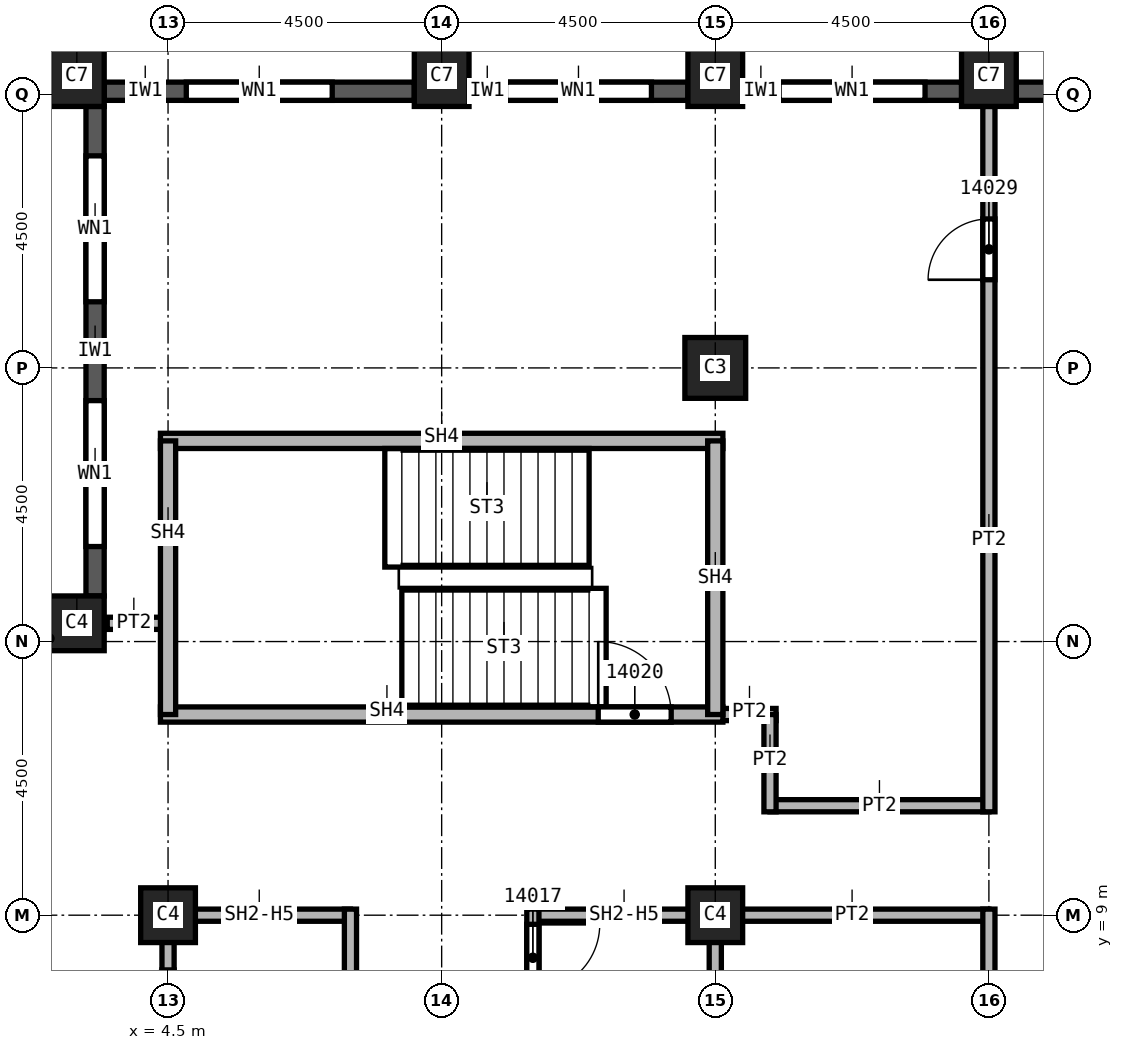
"""IFC4 building model, lengths in metres.
Left out: names, types, materials, properties, quantities, classifications, styles, units other than length and angle.
Written with IfcOpenShell. Run it as: python <this file> out.ifc"""

import sys

from ifc_helpers import new_model, si_unit, direction, frame, frame_2d, origin, origin_2d, place, context, subcontext, project, spatial, rectangle, extrude, element, fill, save


model = new_model("IFC4")
c1 = context("Model", 3, precision=1e-05, world=origin(), true_north=direction((0.0, 1.0)))
c2 = subcontext(c1, "Body", "Model", "MODEL_VIEW")
j1 = project(units=[si_unit("LENGTHUNIT", "METRE"), si_unit("PLANEANGLEUNIT", "RADIAN")], contexts=[c1])
p1 = place(None, origin())
s1 = spatial("IfcSite", under=j1, at=p1, CompositionType="ELEMENT")
p2 = place(p1, origin())
s2 = spatial("IfcBuilding", under=s1, at=p2, CompositionType="ELEMENT")
p3 = place(p2, frame((0.0, 0.0, 220.0)))
s3 = spatial("IfcBuildingStorey", under=s2, at=p3, CompositionType="ELEMENT", Elevation=220.0)
p4 = place(p3, frame((13.5, 18.0, 0.0), z_axis=(0.0, 0.0, 1.0), x_axis=(1.0, 0.0, 0.0)))
e1 = element("IfcColumn", 1, at=p4, inside=s3, PredefinedType="COLUMN", context=c2, shape_type="SweptSolid", body=[
    extrude(rectangle(XDim=1.0, YDim=1.0, at=origin_2d()), origin(), (0.0, 0.0, 1.0), 3.72),
])
for number, where, z_axis, x_axis in (
    (2, (4.5, 9.0, 0.0), (0.0, 0.0, 1.0), (1.0, 0.0, 0.0)),
    (3, (13.5, 9.0, 0.0), (0.0, 0.0, 1.0), (1.0, 0.0, 0.0)),
):
    element("IfcColumn", number, at=place(p3, frame(where, z_axis=z_axis, x_axis=x_axis)), inside=s3, PredefinedType="COLUMN", context=c2, shape_type="SweptSolid", body=[
        extrude(rectangle(XDim=0.9, YDim=0.9, at=origin_2d()), origin(), (0.0, 0.0, 1.0), 3.72),
    ])
for number, where, z_axis, x_axis in (
    (4, (3.0, 22.8, 0.0), (0.0, 0.0, 1.0), (1.0, 0.0, 0.0)),
    (5, (9.0, 22.8, 0.0), (0.0, 0.0, 1.0), (1.0, 0.0, 0.0)),
    (6, (13.5, 22.8, 0.0), (0.0, 0.0, 1.0), (1.0, 0.0, 0.0)),
    (7, (18.0, 22.8, 0.0), (0.0, 0.0, 1.0), (1.0, 0.0, 0.0)),
):
    element("IfcColumn", number, at=place(p3, frame(where, z_axis=z_axis, x_axis=x_axis)), inside=s3, PredefinedType="COLUMN", context=c2, shape_type="SweptSolid", body=[
        extrude(rectangle(XDim=0.9, YDim=1.0, at=origin_2d()), origin(), (0.0, 0.0, 1.0), 3.72),
    ])
p5 = place(p3, frame((3.0, 13.8, 0.0), z_axis=(0.0, 0.0, 1.0), x_axis=(1.0, 0.0, 0.0)))
e8 = element("IfcColumn", 8, at=p5, inside=s3, PredefinedType="COLUMN", context=c2, shape_type="SweptSolid", body=[
    extrude(rectangle(XDim=0.9, YDim=0.9, at=origin_2d()), origin(), (0.0, 0.0, 1.0), 3.72),
])
p6 = place(p3, frame((22.05, 22.55, 0.0), z_axis=(0.0, 0.0, 1.0), x_axis=(-1.0, 0.0, 0.0)))
e9 = element("IfcWall", 9, at=p6, inside=s3, PredefinedType="SOLIDWALL", context=c2, shape_type="SweptSolid", body=[
    extrude(rectangle(XDim=3.6, YDim=0.3, at=frame_2d((1.8, 0.0))), origin(), (0.0, 0.0, 1.0), 3.12),
])
p7 = place(p6, frame((0.775, 0.0, 0.8)))
e10 = element("IfcOpeningElement", 10, at=p7, cuts=e9, PredefinedType="OPENING", context=c2, shape_type="SweptSolid", body=[
    extrude(rectangle(XDim=1.0, YDim=1.95, at=frame_2d((0.5, 0.975))), frame((0.0, 0.15, 0.0), z_axis=(0.0, -1.0, 0.0), x_axis=(1.0, 0.0, 0.0)), (0.0, 0.0, 1.0), 0.3),
])
p8 = place(p6, frame((2.375, 0.0, 0.8)))
e11 = element("IfcOpeningElement", 11, at=p8, cuts=e9, PredefinedType="OPENING", context=c2, shape_type="SweptSolid", body=[
    extrude(rectangle(XDim=0.6, YDim=1.95, at=frame_2d((0.3, 0.975))), frame((0.0, 0.15, 0.0), z_axis=(0.0, -1.0, 0.0), x_axis=(1.0, 0.0, 0.0)), (0.0, 0.0, 1.0), 0.3),
])
p9 = place(p3, frame((17.55, 22.55, 0.0), z_axis=(0.0, 0.0, 1.0), x_axis=(-1.0, 0.0, 0.0)))
e12 = element("IfcWall", 12, at=p9, inside=s3, PredefinedType="SOLIDWALL", context=c2, shape_type="SweptSolid", body=[
    extrude(rectangle(XDim=3.6, YDim=0.3, at=frame_2d((1.8, 0.0))), origin(), (0.0, 0.0, 1.0), 3.12),
])
p10 = place(p9, frame((0.6, 0.0, 0.8)))
e13 = element("IfcOpeningElement", 13, at=p10, cuts=e12, PredefinedType="OPENING", context=c2, shape_type="SweptSolid", body=[
    extrude(rectangle(XDim=2.4, YDim=1.95, at=frame_2d((1.2, 0.975))), frame((0.0, 0.15, 0.0), z_axis=(0.0, -1.0, 0.0), x_axis=(1.0, 0.0, 0.0)), (0.0, 0.0, 1.0), 0.3),
])
p11 = place(p3, frame((13.05, 22.55, 0.0), z_axis=(0.0, 0.0, 1.0), x_axis=(-1.0, 0.0, 0.0)))
e14 = element("IfcWall", 14, at=p11, inside=s3, PredefinedType="SOLIDWALL", context=c2, shape_type="SweptSolid", body=[
    extrude(rectangle(XDim=3.6, YDim=0.3, at=frame_2d((1.8, 0.0))), origin(), (0.0, 0.0, 1.0), 3.12),
])
p12 = place(p11, frame((0.6, 0.0, 0.8)))
e15 = element("IfcOpeningElement", 15, at=p12, cuts=e14, PredefinedType="OPENING", context=c2, shape_type="SweptSolid", body=[
    extrude(rectangle(XDim=2.4, YDim=1.95, at=frame_2d((1.2, 0.975))), frame((0.0, 0.15, 0.0), z_axis=(0.0, -1.0, 0.0), x_axis=(1.0, 0.0, 0.0)), (0.0, 0.0, 1.0), 0.3),
])
p13 = place(p3, frame((8.55, 22.55, 0.0), z_axis=(0.0, 0.0, 1.0), x_axis=(-1.0, 0.0, 0.0)))
e16 = element("IfcWall", 16, at=p13, inside=s3, PredefinedType="SOLIDWALL", context=c2, shape_type="SweptSolid", body=[
    extrude(rectangle(XDim=5.1, YDim=0.3, at=frame_2d((2.55, 0.0))), origin(), (0.0, 0.0, 1.0), 3.12),
])
p14 = place(p13, frame((1.35, 0.0, 0.8)))
e17 = element("IfcOpeningElement", 17, at=p14, cuts=e16, PredefinedType="OPENING", context=c2, shape_type="SweptSolid", body=[
    extrude(rectangle(XDim=2.4, YDim=1.95, at=frame_2d((1.2, 0.975))), frame((0.0, 0.15, 0.0), z_axis=(0.0, -1.0, 0.0), x_axis=(1.0, 0.0, 0.0)), (0.0, 0.0, 1.0), 0.3),
])
p15 = place(p3, frame((3.3, 22.3, 0.0), z_axis=(0.0, 0.0, 1.0), x_axis=(0.0, -1.0, 0.0)))
e18 = element("IfcWall", 18, at=p15, inside=s3, PredefinedType="SOLIDWALL", context=c2, shape_type="SweptSolid", body=[
    extrude(rectangle(XDim=8.05, YDim=0.3, at=frame_2d((4.025, 0.0))), origin(), (0.0, 0.0, 1.0), 3.12),
])
p16 = place(p15, frame((0.812, 0.0, 0.8)))
e19 = element("IfcOpeningElement", 19, at=p16, cuts=e18, PredefinedType="OPENING", context=c2, shape_type="SweptSolid", body=[
    extrude(rectangle(XDim=2.4, YDim=1.95, at=frame_2d((1.2, 0.975))), frame((0.0, 0.15, 0.0), z_axis=(0.0, -1.0, 0.0), x_axis=(1.0, 0.0, 0.0)), (0.0, 0.0, 1.0), 0.3),
])
p17 = place(p15, frame((4.837, 0.0, 0.8)))
e20 = element("IfcOpeningElement", 20, at=p17, cuts=e18, PredefinedType="OPENING", context=c2, shape_type="SweptSolid", body=[
    extrude(rectangle(XDim=2.4, YDim=1.95, at=frame_2d((1.2, 0.975))), frame((0.0, 0.15, 0.0), z_axis=(0.0, -1.0, 0.0), x_axis=(1.0, 0.0, 0.0)), (0.0, 0.0, 1.0), 0.3),
])
p18 = place(p3, frame((3.5, 13.8, 0.0), z_axis=(0.0, 0.0, 1.0), x_axis=(1.0, 0.0, 0.0)))
e21 = element("IfcWall", 21, at=p18, inside=s3, PredefinedType="PARTITIONING", context=c2, shape_type="SweptSolid", body=[
    extrude(rectangle(XDim=1.0, YDim=0.2, at=frame_2d((0.5, 0.0))), origin(), (0.0, 0.0, 1.0), 3.72),
])
p19 = place(p3, frame((13.375, 12.3, 0.0), z_axis=(0.0, 0.0, 1.0), x_axis=(1.0, 0.0, 0.0)))
e22 = element("IfcWall", 22, at=p19, inside=s3, PredefinedType="PARTITIONING", context=c2, shape_type="SweptSolid", body=[
    extrude(rectangle(XDim=1.125, YDim=0.2, at=frame_2d((0.562, 0.0))), origin(), (0.0, 0.0, 1.0), 3.72),
])
p20 = place(p3, frame((18.0, 9.0, 0.0), z_axis=(0.0, 0.0, 1.0), x_axis=(-1.0, 0.0, 0.0)))
e23 = element("IfcWall", 23, at=p20, inside=s3, PredefinedType="PARTITIONING", context=c2, shape_type="SweptSolid", body=[
    extrude(rectangle(XDim=4.5, YDim=0.2, at=frame_2d((2.25, 0.0))), origin(), (0.0, 0.0, 1.0), 3.72),
])
p21 = place(p3, frame((14.4, 10.8, 0.0), z_axis=(0.0, 0.0, 1.0), x_axis=(1.0, 0.0, 0.0)))
e24 = element("IfcWall", 24, at=p21, inside=s3, PredefinedType="PARTITIONING", context=c2, shape_type="SweptSolid", body=[
    extrude(rectangle(XDim=3.6, YDim=0.2, at=frame_2d((1.8, 0.0))), origin(), (0.0, 0.0, 1.0), 3.72),
])
p22 = place(p3, frame((14.4, 12.3, 0.0), z_axis=(0.0, 0.0, 1.0), x_axis=(0.0, -1.0, 0.0)))
e25 = element("IfcWall", 25, at=p22, inside=s3, PredefinedType="PARTITIONING", context=c2, shape_type="SweptSolid", body=[
    extrude(rectangle(XDim=1.6, YDim=0.2, at=frame_2d((0.8, 0.0))), origin(), (0.0, 0.0, 1.0), 3.72),
])
p23 = place(p3, frame((18.0, -9.1, 0.0), z_axis=(0.0, 0.0, 1.0), x_axis=(0.0, 1.0, 0.0)))
e26 = element("IfcWall", 26, at=p23, inside=s3, PredefinedType="PARTITIONING", context=c2, shape_type="SweptSolid", body=[
    extrude(rectangle(XDim=18.2, YDim=0.2, at=frame_2d((9.1, 0.0))), origin(), (0.0, 0.0, 1.0), 3.72),
])
p24 = place(p23, frame((4.3, 0.0, 0.0)))
e27 = element("IfcOpeningElement", 27, at=p24, cuts=e26, PredefinedType="OPENING", context=c2, shape_type="SweptSolid", body=[
    extrude(rectangle(XDim=1.0, YDim=2.1, at=frame_2d((0.5, 1.05))), frame((0.0, 0.1, 0.0), z_axis=(0.0, -1.0, 0.0), x_axis=(1.0, 0.0, 0.0)), (0.0, 0.0, 1.0), 0.2),
])
p25 = place(p23, frame((12.4, 0.0, 0.0)))
e28 = element("IfcOpeningElement", 28, at=p25, cuts=e26, PredefinedType="OPENING", context=c2, shape_type="SweptSolid", body=[
    extrude(rectangle(XDim=1.0, YDim=2.1, at=frame_2d((0.5, 1.05))), frame((0.0, 0.1, 0.0), z_axis=(0.0, -1.0, 0.0), x_axis=(1.0, 0.0, 0.0)), (0.0, 0.0, 1.0), 0.2),
])
p26 = place(p3, frame((18.0, 10.7, 0.0), z_axis=(0.0, 0.0, 1.0), x_axis=(0.0, 1.0, 0.0)))
e29 = element("IfcWall", 29, at=p26, inside=s3, PredefinedType="PARTITIONING", context=c2, shape_type="SweptSolid", body=[
    extrude(rectangle(XDim=11.6, YDim=0.2, at=frame_2d((5.8, 0.0))), origin(), (0.0, 0.0, 1.0), 3.72),
])
p27 = place(p26, frame((8.75, 0.0, 0.0)))
e30 = element("IfcOpeningElement", 30, at=p27, cuts=e29, PredefinedType="OPENING", context=c2, shape_type="SweptSolid", body=[
    extrude(rectangle(XDim=1.0, YDim=2.1, at=frame_2d((0.5, 1.05))), frame((0.0, 0.1, 0.0), z_axis=(0.0, -1.0, 0.0), x_axis=(1.0, 0.0, 0.0)), (0.0, 0.0, 1.0), 0.2),
])
p28 = place(p3, frame((4.5, 0.0, 0.0), z_axis=(0.0, 0.0, 1.0), x_axis=(0.0, 1.0, 0.0)))
e31 = element("IfcWall", 31, at=p28, inside=s3, PredefinedType="SOLIDWALL", context=c2, shape_type="SweptSolid", body=[
    extrude(rectangle(XDim=9.1, YDim=0.2, at=frame_2d((4.55, 0.0))), origin(), (0.0, 0.0, 1.0), 2.958),
])
p29 = place(p28, frame((3.4, 0.0, 0.0)))
e32 = element("IfcOpeningElement", 32, at=p29, cuts=e31, PredefinedType="OPENING", context=c2, shape_type="SweptSolid", body=[
    extrude(rectangle(XDim=1.1, YDim=2.1, at=frame_2d((0.55, 1.05))), frame((0.0, 0.1, 0.0), z_axis=(0.0, -1.0, 0.0), x_axis=(1.0, 0.0, 0.0)), (0.0, 0.0, 1.0), 0.2),
])
p30 = place(p28, frame((7.0, 0.0, 0.0)))
e33 = element("IfcOpeningElement", 33, at=p30, cuts=e31, PredefinedType="OPENING", context=c2, shape_type="SweptSolid", body=[
    extrude(rectangle(XDim=1.1, YDim=2.1, at=frame_2d((0.55, 1.05))), frame((0.0, 0.1, 0.0), z_axis=(0.0, -1.0, 0.0), x_axis=(1.0, 0.0, 0.0)), (0.0, 0.0, 1.0), 0.2),
])
p31 = place(p3, frame((4.5, 9.0, 0.0), z_axis=(0.0, 0.0, 1.0), x_axis=(1.0, 0.0, 0.0)))
e34 = element("IfcWall", 34, at=p31, inside=s3, PredefinedType="SOLIDWALL", context=c2, shape_type="SweptSolid", body=[
    extrude(rectangle(XDim=3.0, YDim=0.2, at=frame_2d((1.5, 0.0))), origin(), (0.0, 0.0, 1.0), 2.958),
])
p32 = place(p3, frame((7.5, 9.1, 0.0), z_axis=(0.0, 0.0, 1.0), x_axis=(0.0, -1.0, 0.0)))
e35 = element("IfcWall", 35, at=p32, inside=s3, PredefinedType="SOLIDWALL", context=c2, shape_type="SweptSolid", body=[
    extrude(rectangle(XDim=6.225, YDim=0.2, at=frame_2d((3.113, 0.0))), origin(), (0.0, 0.0, 1.0), 3.72),
])
p33 = place(p3, frame((10.5, 9.0, 0.0), z_axis=(0.0, 0.0, 1.0), x_axis=(1.0, 0.0, 0.0)))
e36 = element("IfcWall", 36, at=p33, inside=s3, PredefinedType="SOLIDWALL", context=c2, shape_type="SweptSolid", body=[
    extrude(rectangle(XDim=3.1, YDim=0.2, at=frame_2d((1.55, 0.0))), origin(), (0.0, 0.0, 1.0), 2.958),
])
p34 = place(p3, frame((10.5, 9.1, 0.0), z_axis=(0.0, 0.0, 1.0), x_axis=(0.0, -1.0, 0.0)))
e37 = element("IfcWall", 37, at=p34, inside=s3, PredefinedType="SOLIDWALL", context=c2, shape_type="SweptSolid", body=[
    extrude(rectangle(XDim=3.225, YDim=0.2, at=frame_2d((1.613, 0.0))), origin(), (0.0, 0.0, 1.0), 3.72),
])
p35 = place(p34, frame((0.25, 0.0, 0.0)))
e38 = element("IfcOpeningElement", 38, at=p35, cuts=e37, PredefinedType="OPENING", context=c2, shape_type="SweptSolid", body=[
    extrude(rectangle(XDim=1.1, YDim=2.1, at=frame_2d((0.55, 1.05))), frame((0.0, 0.1, 0.0), z_axis=(0.0, -1.0, 0.0), x_axis=(1.0, 0.0, 0.0)), (0.0, 0.0, 1.0), 0.2),
])
p36 = place(p3, frame((13.5, 9.1, 0.0), z_axis=(0.0, 0.0, 1.0), x_axis=(0.0, -1.0, 0.0)))
e39 = element("IfcWall", 39, at=p36, inside=s3, PredefinedType="SOLIDWALL", context=c2, shape_type="SweptSolid", body=[
    extrude(rectangle(XDim=3.1, YDim=0.2, at=frame_2d((1.55, 0.0))), origin(), (0.0, 0.0, 1.0), 2.958),
])
p37 = place(p3, frame((4.375, 12.3, 0.0), z_axis=(0.0, 0.0, 1.0), x_axis=(1.0, 0.0, 0.0)))
e40 = element("IfcWall", 40, at=p37, inside=s3, PredefinedType="SOLIDWALL", context=c2, shape_type="SweptSolid", body=[
    extrude(rectangle(XDim=9.25, YDim=0.25, at=frame_2d((4.625, 0.0))), origin(), (0.0, 0.0, 1.0), 3.72),
])
p38 = place(p37, frame((7.2, 0.0, 0.0)))
e41 = element("IfcOpeningElement", 41, at=p38, cuts=e40, PredefinedType="OPENING", context=c2, shape_type="SweptSolid", body=[
    extrude(rectangle(XDim=1.2, YDim=2.1, at=frame_2d((0.6, 1.05))), frame((0.0, 0.125, 0.0), z_axis=(0.0, -1.0, 0.0), x_axis=(1.0, 0.0, 0.0)), (0.0, 0.0, 1.0), 0.25),
])
p39 = place(p3, frame((4.375, 16.8, 0.0), z_axis=(0.0, 0.0, 1.0), x_axis=(1.0, 0.0, 0.0)))
e42 = element("IfcWall", 42, at=p39, inside=s3, PredefinedType="SOLIDWALL", context=c2, shape_type="SweptSolid", body=[
    extrude(rectangle(XDim=9.25, YDim=0.25, at=frame_2d((4.625, 0.0))), origin(), (0.0, 0.0, 1.0), 3.72),
])
for number, where, z_axis, x_axis in (
    (43, (4.5, 12.3, 0.0), (0.0, 0.0, 1.0), (0.0, 1.0, 0.0)),
    (44, (13.5, 16.8, 0.0), (0.0, 0.0, 1.0), (0.0, -1.0, 0.0)),
):
    element("IfcWall", number, at=place(p3, frame(where, z_axis=z_axis, x_axis=x_axis)), inside=s3, PredefinedType="SOLIDWALL", context=c2, shape_type="SweptSolid", body=[
        extrude(rectangle(XDim=4.5, YDim=0.25, at=frame_2d((2.25, 0.0))), origin(), (0.0, 0.0, 1.0), 3.72),
    ])
p40 = place(p10, origin())
e45 = element("IfcWindow", 45, at=p40, inside=s3, PartitioningType="SINGLE_PANEL", PredefinedType="WINDOW", context=c2, shape_type="SweptSolid", body=[
    extrude(rectangle(XDim=2.4, YDim=1.95, at=frame_2d((1.2, 0.975))), frame((0.0, 0.03, 0.0), z_axis=(0.0, -1.0, 0.0), x_axis=(1.0, 0.0, 0.0)), (0.0, 0.0, 1.0), 0.06),
])
fill(e13, e45)
p41 = place(p12, origin())
e46 = element("IfcWindow", 46, at=p41, inside=s3, PartitioningType="SINGLE_PANEL", PredefinedType="WINDOW", context=c2, shape_type="SweptSolid", body=[
    extrude(rectangle(XDim=2.4, YDim=1.95, at=frame_2d((1.2, 0.975))), frame((0.0, 0.03, 0.0), z_axis=(0.0, -1.0, 0.0), x_axis=(1.0, 0.0, 0.0)), (0.0, 0.0, 1.0), 0.06),
])
fill(e15, e46)
p42 = place(p14, origin())
e47 = element("IfcWindow", 47, at=p42, inside=s3, PartitioningType="SINGLE_PANEL", PredefinedType="WINDOW", context=c2, shape_type="SweptSolid", body=[
    extrude(rectangle(XDim=2.4, YDim=1.95, at=frame_2d((1.2, 0.975))), frame((0.0, 0.03, 0.0), z_axis=(0.0, -1.0, 0.0), x_axis=(1.0, 0.0, 0.0)), (0.0, 0.0, 1.0), 0.06),
])
fill(e17, e47)
p43 = place(p16, origin())
e48 = element("IfcWindow", 48, at=p43, inside=s3, PartitioningType="SINGLE_PANEL", PredefinedType="WINDOW", context=c2, shape_type="SweptSolid", body=[
    extrude(rectangle(XDim=2.4, YDim=1.95, at=frame_2d((1.2, 0.975))), frame((0.0, 0.03, 0.0), z_axis=(0.0, -1.0, 0.0), x_axis=(1.0, 0.0, 0.0)), (0.0, 0.0, 1.0), 0.06),
])
fill(e19, e48)
p44 = place(p17, origin())
e49 = element("IfcWindow", 49, at=p44, inside=s3, PartitioningType="SINGLE_PANEL", PredefinedType="WINDOW", context=c2, shape_type="SweptSolid", body=[
    extrude(rectangle(XDim=2.4, YDim=1.95, at=frame_2d((1.2, 0.975))), frame((0.0, 0.03, 0.0), z_axis=(0.0, -1.0, 0.0), x_axis=(1.0, 0.0, 0.0)), (0.0, 0.0, 1.0), 0.06),
])
fill(e20, e49)
p45 = place(p35, origin())
e50 = element("IfcDoor", 50, at=p45, inside=s3, OperationType="SINGLE_SWING_RIGHT", PredefinedType="DOOR", context=c2, shape_type="SweptSolid", body=[
    extrude(rectangle(XDim=1.1, YDim=2.1, at=frame_2d((0.55, 1.05))), frame((0.0, 0.025, 0.0), z_axis=(0.0, -1.0, 0.0), x_axis=(1.0, 0.0, 0.0)), (0.0, 0.0, 1.0), 0.05),
])
fill(e38, e50)
p46 = place(p38, origin())
e51 = element("IfcDoor", 51, at=p46, inside=s3, OperationType="SINGLE_SWING_LEFT", PredefinedType="DOOR", context=c2, shape_type="SweptSolid", body=[
    extrude(rectangle(XDim=1.2, YDim=2.1, at=frame_2d((0.6, 1.05))), frame((0.0, 0.025, 0.0), z_axis=(0.0, -1.0, 0.0), x_axis=(1.0, 0.0, 0.0)), (0.0, 0.0, 1.0), 0.05),
])
fill(e41, e51)
p47 = place(p27, origin())
e52 = element("IfcDoor", 52, at=p47, inside=s3, OperationType="SINGLE_SWING_RIGHT", PredefinedType="DOOR", context=c2, shape_type="SweptSolid", body=[
    extrude(rectangle(XDim=1.0, YDim=2.1, at=frame_2d((0.5, 1.05))), frame((0.0, 0.025, 0.0), z_axis=(0.0, -1.0, 0.0), x_axis=(1.0, 0.0, 0.0)), (0.0, 0.0, 1.0), 0.05),
])
fill(e30, e52)
save(model, sys.argv[1])
